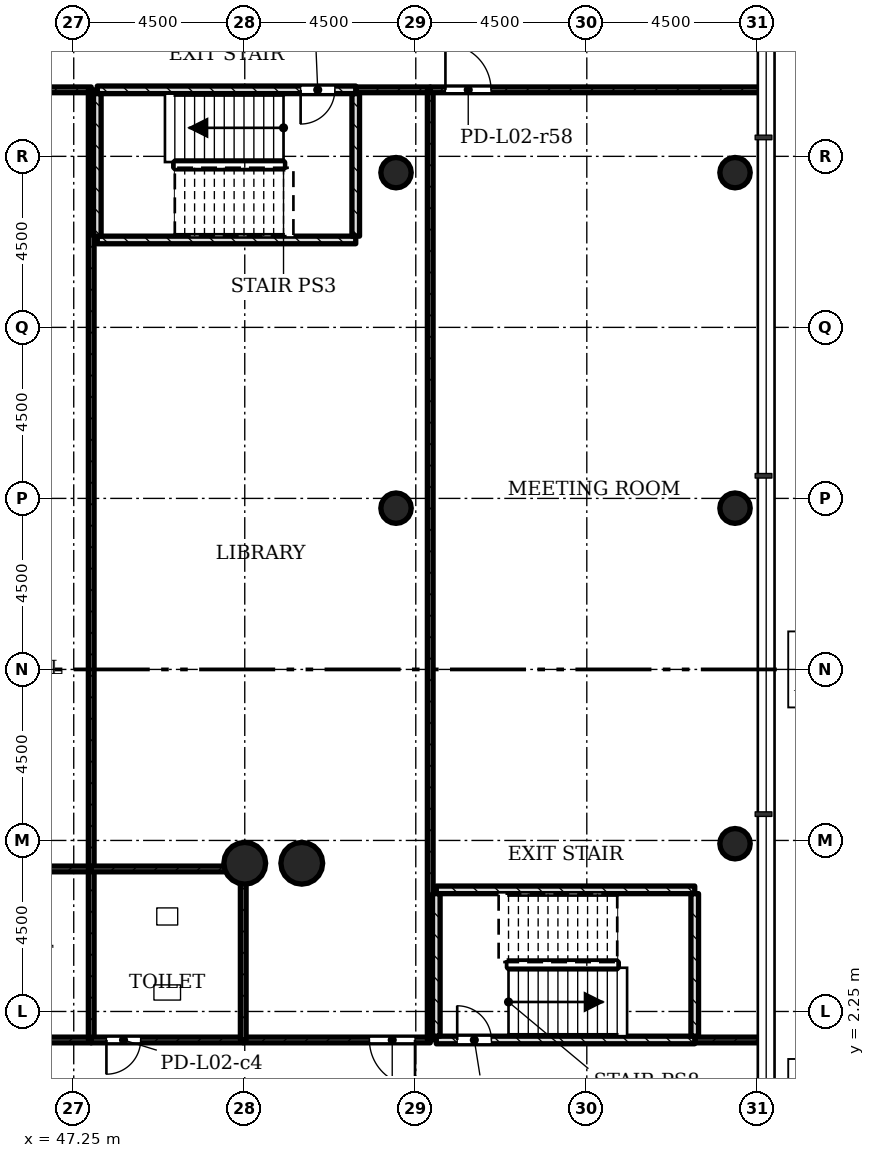
"""IFC4 building model, lengths in metres.
Left out: names, types, materials, properties, quantities, classifications, styles, units other than length and angle.
Written with IfcOpenShell. Run it as: python <this file> out.ifc"""

import sys

from ifc_helpers import new_model, si_unit, direction, frame, frame_2d, origin, origin_2d, place, context, subcontext, project, spatial, rectangle, hollow_circle, extrude, element, fill, save


model = new_model("IFC4")
c1 = context("Model", 3, precision=1e-05, world=origin(), true_north=direction((0.0, 1.0)))
c2 = subcontext(c1, "Body", "Model", "MODEL_VIEW")
j1 = project(units=[si_unit("LENGTHUNIT", "METRE"), si_unit("PLANEANGLEUNIT", "RADIAN")], contexts=[c1])
p1 = place(None, origin())
s1 = spatial("IfcSite", under=j1, at=p1, CompositionType="ELEMENT")
p2 = place(p1, origin())
s2 = spatial("IfcBuilding", under=s1, at=p2, CompositionType="ELEMENT")
p3 = place(p2, frame((0.0, 0.0, 11.0)))
s3 = spatial("IfcBuildingStorey", under=s2, at=p3, CompositionType="ELEMENT", Elevation=11.0)
for number, where, z_axis, x_axis in (
    (1, (51.75, 6.15, 0.0), (0.0, 0.0, 1.0), (1.0, 0.0, 0.0)),
    (2, (53.25, 6.15, 0.0), (0.0, 0.0, 1.0), (1.0, 0.0, 0.0)),
):
    element("IfcColumn", number, at=place(p3, frame(where, z_axis=z_axis, x_axis=x_axis)), inside=s3, PredefinedType="COLUMN", context=c2, shape_type="SweptSolid", body=[
        extrude(hollow_circle(Radius=0.55, WallThickness=0.04, at=origin_2d()), origin(), (0.0, 0.0, 1.0), 4.5),
    ])
for number, where, z_axis, x_axis in (
    (3, (64.65, 6.664, 0.0), (0.0, 0.0, 1.0), (1.0, 0.0, 0.0)),
    (4, (55.73, 15.493, 0.0), (0.0, 0.0, 1.0), (1.0, 0.0, 0.0)),
    (5, (64.65, 15.493, 0.0), (0.0, 0.0, 1.0), (1.0, 0.0, 0.0)),
    (6, (55.73, 24.321, 0.0), (0.0, 0.0, 1.0), (1.0, 0.0, 0.0)),
    (7, (64.65, 24.321, 0.0), (0.0, 0.0, 1.0), (1.0, 0.0, 0.0)),
):
    element("IfcColumn", number, at=place(p3, frame(where, z_axis=z_axis, x_axis=x_axis)), inside=s3, PredefinedType="COLUMN", context=c2, shape_type="SweptSolid", body=[
        extrude(hollow_circle(Radius=0.4, WallThickness=0.028, at=origin_2d()), origin(), (0.0, 0.0, 1.0), 4.5),
    ])
p4 = place(p3, frame((38.79, 26.5, 0.0), z_axis=(0.0, 0.0, 1.0), x_axis=(1.0, 0.0, 0.0)))
e8 = element("IfcWall", 8, at=p4, inside=s3, PredefinedType="PARTITIONING", context=c2, shape_type="SweptSolid", body=[
    extrude(rectangle(XDim=8.92, YDim=0.15, at=frame_2d((4.46, 0.0))), origin(), (0.0, 0.0, 1.0), 4.08),
])
p5 = place(p4, frame((0.4, 0.0, 0.0)))
e9 = element("IfcOpeningElement", 9, at=p5, cuts=e8, PredefinedType="OPENING", context=c2, shape_type="SweptSolid", body=[
    extrude(rectangle(XDim=1.2, YDim=2.1, at=frame_2d((0.6, 1.05))), frame((0.0, 0.085, 0.0), z_axis=(0.0, -1.0, 0.0), x_axis=(1.0, 0.0, 0.0)), (0.0, 0.0, 1.0), 0.17),
])
p6 = place(p3, frame((47.71, 26.5, 0.0), z_axis=(0.0, 0.0, 1.0), x_axis=(0.0, -1.0, 0.0)))
e10 = element("IfcWall", 10, at=p6, inside=s3, PredefinedType="PARTITIONING", context=c2, shape_type="SweptSolid", body=[
    extrude(rectangle(XDim=20.5, YDim=0.15, at=frame_2d((10.25, 0.0))), origin(), (0.0, 0.0, 1.0), 4.08),
])
p7 = place(p3, frame((54.67, 26.5, 0.0), z_axis=(0.0, 0.0, 1.0), x_axis=(1.0, 0.0, 0.0)))
e11 = element("IfcWall", 11, at=p7, inside=s3, PredefinedType="PARTITIONING", context=c2, shape_type="SweptSolid", body=[
    extrude(rectangle(XDim=1.96, YDim=0.15, at=frame_2d((0.98, 0.0))), origin(), (0.0, 0.0, 1.0), 4.08),
])
p8 = place(p3, frame((56.63, 1.5, 0.0), z_axis=(0.0, 0.0, 1.0), x_axis=(-1.0, 0.0, 0.0)))
e12 = element("IfcWall", 12, at=p8, inside=s3, PredefinedType="PARTITIONING", context=c2, shape_type="SweptSolid", body=[
    extrude(rectangle(XDim=4.92, YDim=0.15, at=frame_2d((2.46, 0.0))), origin(), (0.0, 0.0, 1.0), 4.08),
])
p9 = place(p8, frame((0.4, 0.0, 0.0)))
e13 = element("IfcOpeningElement", 13, at=p9, cuts=e12, PredefinedType="OPENING", context=c2, shape_type="SweptSolid", body=[
    extrude(rectangle(XDim=1.2, YDim=2.1, at=frame_2d((0.6, 1.05))), frame((0.0, 0.085, 0.0), z_axis=(0.0, -1.0, 0.0), x_axis=(1.0, 0.0, 0.0)), (0.0, 0.0, 1.0), 0.17),
])
p10 = place(p3, frame((56.63, 26.5, 0.0), z_axis=(0.0, 0.0, 1.0), x_axis=(0.0, -1.0, 0.0)))
e14 = element("IfcWall", 14, at=p10, inside=s3, PredefinedType="PARTITIONING", context=c2, shape_type="SweptSolid", body=[
    extrude(rectangle(XDim=25.0, YDim=0.15, at=frame_2d((12.5, 0.0))), origin(), (0.0, 0.0, 1.0), 4.08),
])
p11 = place(p3, frame((56.63, 26.5, 0.0), z_axis=(0.0, 0.0, 1.0), x_axis=(1.0, 0.0, 0.0)))
e15 = element("IfcWall", 15, at=p11, inside=s3, PredefinedType="PARTITIONING", context=c2, shape_type="SweptSolid", body=[
    extrude(rectangle(XDim=8.72, YDim=0.15, at=frame_2d((4.36, 0.0))), origin(), (0.0, 0.0, 1.0), 4.08),
])
p12 = place(p11, frame((0.4, 0.0, 0.0)))
e16 = element("IfcOpeningElement", 16, at=p12, cuts=e15, PredefinedType="OPENING", context=c2, shape_type="SweptSolid", body=[
    extrude(rectangle(XDim=1.2, YDim=2.1, at=frame_2d((0.6, 1.05))), frame((0.0, 0.085, 0.0), z_axis=(0.0, -1.0, 0.0), x_axis=(1.0, 0.0, 0.0)), (0.0, 0.0, 1.0), 0.17),
])
p13 = place(p3, frame((65.35, 1.5, 0.0), z_axis=(0.0, 0.0, 1.0), x_axis=(-1.0, 0.0, 0.0)))
e17 = element("IfcWall", 17, at=p13, inside=s3, PredefinedType="PARTITIONING", context=c2, shape_type="SweptSolid", body=[
    extrude(rectangle(XDim=1.76, YDim=0.15, at=frame_2d((0.88, 0.0))), origin(), (0.0, 0.0, 1.0), 4.08),
])
p14 = place(p3, frame((43.71, 1.5, 0.0), z_axis=(0.0, 0.0, 1.0), x_axis=(1.0, 0.0, 0.0)))
e18 = element("IfcWall", 18, at=p14, inside=s3, PredefinedType="PARTITIONING", context=c2, shape_type="SweptSolid", body=[
    extrude(rectangle(XDim=4.0, YDim=0.15, at=frame_2d((2.0, 0.0))), origin(), (0.0, 0.0, 1.0), 4.08),
])
p15 = place(p14, frame((0.4, 0.0, 0.0)))
e19 = element("IfcOpeningElement", 19, at=p15, cuts=e18, PredefinedType="OPENING", context=c2, shape_type="SweptSolid", body=[
    extrude(rectangle(XDim=0.9, YDim=2.1, at=frame_2d((0.45, 1.05))), frame((0.0, 0.085, 0.0), z_axis=(0.0, -1.0, 0.0), x_axis=(1.0, 0.0, 0.0)), (0.0, 0.0, 1.0), 0.17),
])
p16 = place(p3, frame((47.71, 6.0, 0.0), z_axis=(0.0, 0.0, 1.0), x_axis=(-1.0, 0.0, 0.0)))
e20 = element("IfcWall", 20, at=p16, inside=s3, PredefinedType="PARTITIONING", context=c2, shape_type="SweptSolid", body=[
    extrude(rectangle(XDim=4.0, YDim=0.15, at=frame_2d((2.0, 0.0))), origin(), (0.0, 0.0, 1.0), 4.08),
])
p17 = place(p3, frame((47.71, 1.5, 0.0), z_axis=(0.0, 0.0, 1.0), x_axis=(0.0, 1.0, 0.0)))
e21 = element("IfcWall", 21, at=p17, inside=s3, PredefinedType="PARTITIONING", context=c2, shape_type="SweptSolid", body=[
    extrude(rectangle(XDim=4.5, YDim=0.15, at=frame_2d((2.25, 0.0))), origin(), (0.0, 0.0, 1.0), 4.08),
])
p18 = place(p3, frame((47.71, 1.5, 0.0), z_axis=(0.0, 0.0, 1.0), x_axis=(1.0, 0.0, 0.0)))
e22 = element("IfcWall", 22, at=p18, inside=s3, PredefinedType="PARTITIONING", context=c2, shape_type="SweptSolid", body=[
    extrude(rectangle(XDim=4.0, YDim=0.15, at=frame_2d((2.0, 0.0))), origin(), (0.0, 0.0, 1.0), 4.08),
])
p19 = place(p18, frame((0.4, 0.0, 0.0)))
e23 = element("IfcOpeningElement", 23, at=p19, cuts=e22, PredefinedType="OPENING", context=c2, shape_type="SweptSolid", body=[
    extrude(rectangle(XDim=0.9, YDim=2.1, at=frame_2d((0.45, 1.05))), frame((0.0, 0.085, 0.0), z_axis=(0.0, -1.0, 0.0), x_axis=(1.0, 0.0, 0.0)), (0.0, 0.0, 1.0), 0.17),
])
p20 = place(p3, frame((51.71, 1.5, 0.0), z_axis=(0.0, 0.0, 1.0), x_axis=(0.0, 1.0, 0.0)))
e24 = element("IfcWall", 24, at=p20, inside=s3, PredefinedType="PARTITIONING", context=c2, shape_type="SweptSolid", body=[
    extrude(rectangle(XDim=4.5, YDim=0.15, at=frame_2d((2.25, 0.0))), origin(), (0.0, 0.0, 1.0), 4.08),
])
p21 = place(p3, frame((51.71, 6.0, 0.0), z_axis=(0.0, 0.0, 1.0), x_axis=(-1.0, 0.0, 0.0)))
e25 = element("IfcWall", 25, at=p21, inside=s3, PredefinedType="PARTITIONING", context=c2, shape_type="SweptSolid", body=[
    extrude(rectangle(XDim=4.0, YDim=0.15, at=frame_2d((2.0, 0.0))), origin(), (0.0, 0.0, 1.0), 4.08),
])
p22 = place(p3, frame((47.87, 26.5, 0.0), z_axis=(0.0, 0.0, 1.0), x_axis=(1.0, 0.0, 0.0)))
e26 = element("IfcWall", 26, at=p22, inside=s3, PredefinedType="SHEAR", context=c2, shape_type="SweptSolid", body=[
    extrude(rectangle(XDim=6.8, YDim=0.2, at=frame_2d((3.4, 0.0))), origin(), (0.0, 0.0, 1.0), 4.08),
])
p23 = place(p22, frame((5.35, 0.0, 0.0)))
e27 = element("IfcOpeningElement", 27, at=p23, cuts=e26, PredefinedType="OPENING", context=c2, shape_type="SweptSolid", body=[
    extrude(rectangle(XDim=0.9, YDim=2.1, at=frame_2d((0.45, 1.05))), frame((0.0, 0.11, 0.0), z_axis=(0.0, -1.0, 0.0), x_axis=(1.0, 0.0, 0.0)), (0.0, 0.0, 1.0), 0.22),
])
p24 = place(p3, frame((47.87, 22.55, 0.0), z_axis=(0.0, 0.0, 1.0), x_axis=(1.0, 0.0, 0.0)))
e28 = element("IfcWall", 28, at=p24, inside=s3, PredefinedType="SHEAR", context=c2, shape_type="SweptSolid", body=[
    extrude(rectangle(XDim=6.8, YDim=0.2, at=frame_2d((3.4, 0.0))), origin(), (0.0, 0.0, 1.0), 4.08),
])
for number, where, z_axis, x_axis in (
    (29, (47.87, 22.65, 0.0), (0.0, 0.0, 1.0), (0.0, 1.0, 0.0)),
    (30, (54.67, 22.65, 0.0), (0.0, 0.0, 1.0), (0.0, 1.0, 0.0)),
):
    element("IfcWall", number, at=place(p3, frame(where, z_axis=z_axis, x_axis=x_axis)), inside=s3, PredefinedType="SHEAR", context=c2, shape_type="SweptSolid", body=[
        extrude(rectangle(XDim=3.75, YDim=0.2, at=frame_2d((1.875, 0.0))), origin(), (0.0, 0.0, 1.0), 4.08),
    ])
p25 = place(p3, frame((56.79, 1.5, 0.0), z_axis=(0.0, 0.0, 1.0), x_axis=(1.0, 0.0, 0.0)))
e31 = element("IfcWall", 31, at=p25, inside=s3, PredefinedType="SHEAR", context=c2, shape_type="SweptSolid", body=[
    extrude(rectangle(XDim=6.8, YDim=0.2, at=frame_2d((3.4, 0.0))), origin(), (0.0, 0.0, 1.0), 4.08),
])
p26 = place(p25, frame((0.55, 0.0, 0.0)))
e32 = element("IfcOpeningElement", 32, at=p26, cuts=e31, PredefinedType="OPENING", context=c2, shape_type="SweptSolid", body=[
    extrude(rectangle(XDim=0.9, YDim=2.1, at=frame_2d((0.45, 1.05))), frame((0.0, 0.11, 0.0), z_axis=(0.0, -1.0, 0.0), x_axis=(1.0, 0.0, 0.0)), (0.0, 0.0, 1.0), 0.22),
])
p27 = place(p3, frame((56.79, 5.45, 0.0), z_axis=(0.0, 0.0, 1.0), x_axis=(1.0, 0.0, 0.0)))
e33 = element("IfcWall", 33, at=p27, inside=s3, PredefinedType="SHEAR", context=c2, shape_type="SweptSolid", body=[
    extrude(rectangle(XDim=6.8, YDim=0.2, at=frame_2d((3.4, 0.0))), origin(), (0.0, 0.0, 1.0), 4.08),
])
for number, where, z_axis, x_axis in (
    (34, (56.79, 1.6, 0.0), (0.0, 0.0, 1.0), (0.0, 1.0, 0.0)),
    (35, (63.59, 1.6, 0.0), (0.0, 0.0, 1.0), (0.0, 1.0, 0.0)),
):
    element("IfcWall", number, at=place(p3, frame(where, z_axis=z_axis, x_axis=x_axis)), inside=s3, PredefinedType="SHEAR", context=c2, shape_type="SweptSolid", body=[
        extrude(rectangle(XDim=3.75, YDim=0.2, at=frame_2d((1.875, 0.0))), origin(), (0.0, 0.0, 1.0), 4.08),
    ])
p28 = place(p9, origin())
e36 = element("IfcDoor", 36, at=p28, inside=s3, OperationType="SINGLE_SWING_RIGHT", PredefinedType="DOOR", context=c2, shape_type="SweptSolid", body=[
    extrude(rectangle(XDim=1.2, YDim=2.1, at=frame_2d((0.6, 1.05))), frame((0.0, 0.025, 0.0), z_axis=(0.0, -1.0, 0.0), x_axis=(1.0, 0.0, 0.0)), (0.0, 0.0, 1.0), 0.05),
])
fill(e13, e36)
p29 = place(p12, origin())
e37 = element("IfcDoor", 37, at=p29, inside=s3, OperationType="SINGLE_SWING_RIGHT", PredefinedType="DOOR", context=c2, shape_type="SweptSolid", body=[
    extrude(rectangle(XDim=1.2, YDim=2.1, at=frame_2d((0.6, 1.05))), frame((0.0, 0.025, 0.0), z_axis=(0.0, -1.0, 0.0), x_axis=(1.0, 0.0, 0.0)), (0.0, 0.0, 1.0), 0.05),
])
fill(e16, e37)
p30 = place(p19, origin())
e38 = element("IfcDoor", 38, at=p30, inside=s3, OperationType="SINGLE_SWING_LEFT", PredefinedType="DOOR", context=c2, shape_type="SweptSolid", body=[
    extrude(rectangle(XDim=0.9, YDim=2.1, at=frame_2d((0.45, 1.05))), frame((0.0, 0.025, 0.0), z_axis=(0.0, -1.0, 0.0), x_axis=(1.0, 0.0, 0.0)), (0.0, 0.0, 1.0), 0.05),
])
fill(e23, e38)
p31 = place(p23, origin())
e39 = element("IfcDoor", 39, at=p31, inside=s3, OperationType="SINGLE_SWING_LEFT", PredefinedType="DOOR", context=c2, shape_type="SweptSolid", body=[
    extrude(rectangle(XDim=0.9, YDim=2.1, at=frame_2d((0.45, 1.05))), frame((0.0, 0.025, 0.0), z_axis=(0.0, -1.0, 0.0), x_axis=(1.0, 0.0, 0.0)), (0.0, 0.0, 1.0), 0.05),
])
fill(e27, e39)
p32 = place(p26, origin())
e40 = element("IfcDoor", 40, at=p32, inside=s3, OperationType="SINGLE_SWING_RIGHT", PredefinedType="DOOR", context=c2, shape_type="SweptSolid", body=[
    extrude(rectangle(XDim=0.9, YDim=2.1, at=frame_2d((0.45, 1.05))), frame((0.0, 0.025, 0.0), z_axis=(0.0, -1.0, 0.0), x_axis=(1.0, 0.0, 0.0)), (0.0, 0.0, 1.0), 0.05),
])
fill(e32, e40)
save(model, sys.argv[1])
